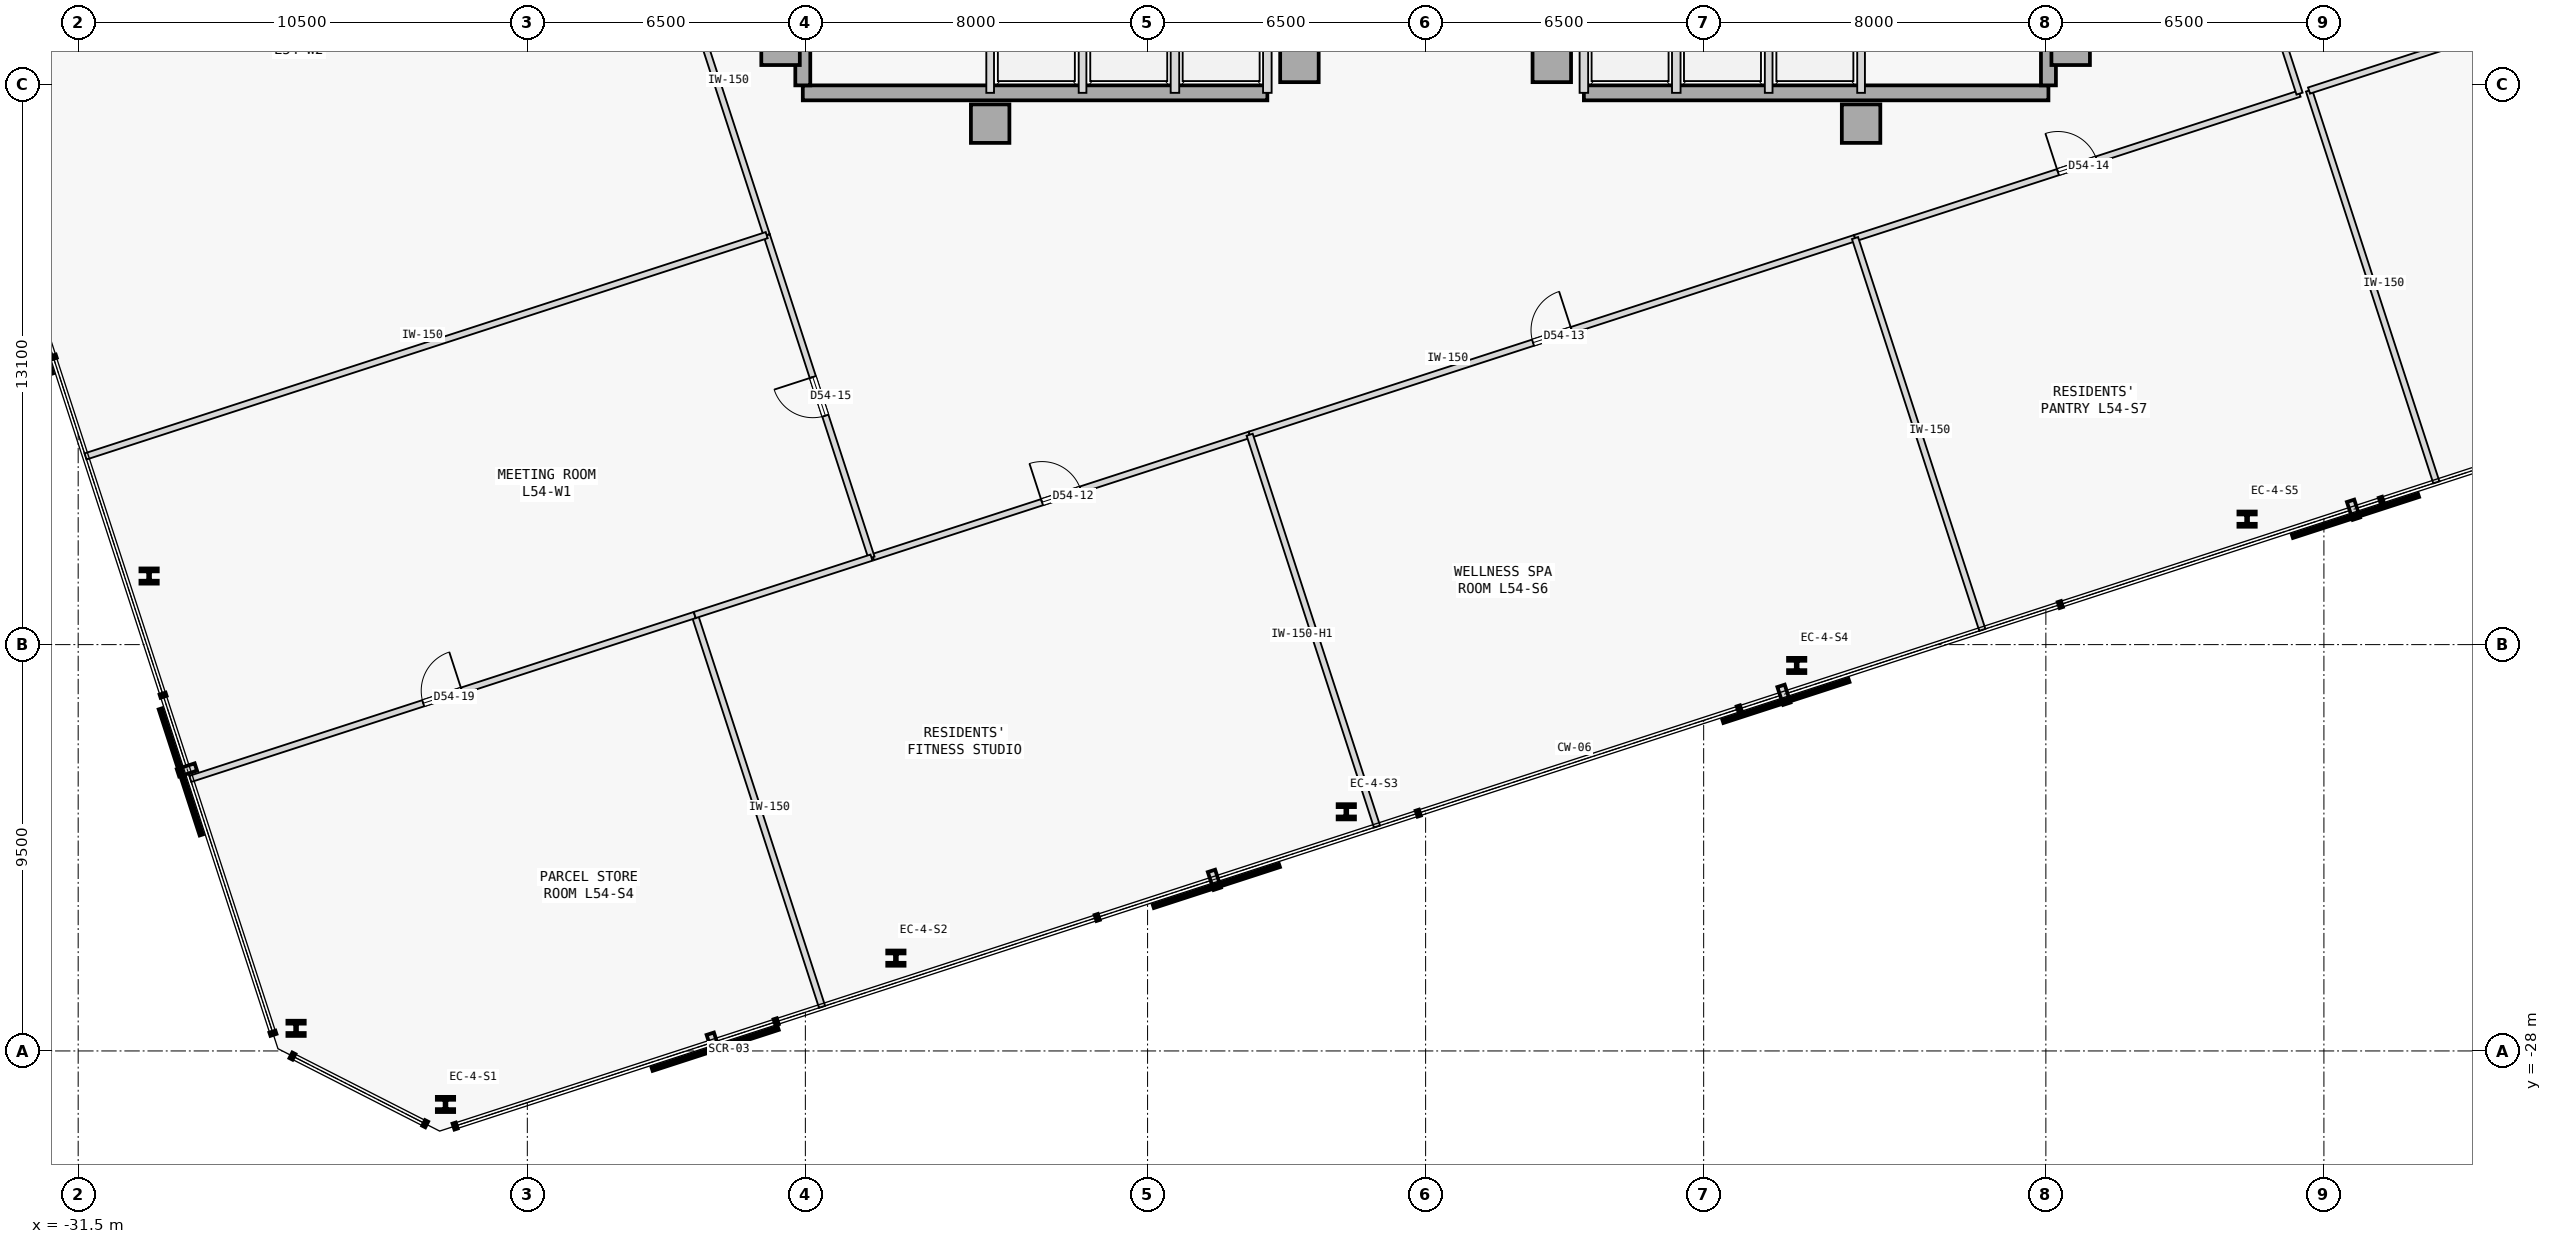
"""IFC4 building model, lengths in metres.
Left out: names, types, materials, properties, quantities, classifications, styles, units other than length and angle.
Written with IfcOpenShell. Run it as: python <this file> out.ifc"""

import sys

from ifc_helpers import new_model, si_unit, direction, frame, frame_2d, origin, origin_2d, place, context, subcontext, project, spatial, rectangle, i_section, extrude, element, fill, save


model = new_model("IFC4")
c1 = context("Model", 3, precision=1e-05, world=origin(), true_north=direction((0.0, 1.0)))
c2 = subcontext(c1, "Body", "Model", "MODEL_VIEW")
j1 = project(units=[si_unit("LENGTHUNIT", "METRE"), si_unit("PLANEANGLEUNIT", "RADIAN")], contexts=[c1])
p1 = place(None, origin())
s1 = spatial("IfcSite", under=j1, at=p1, CompositionType="ELEMENT")
p2 = place(p1, origin())
s2 = spatial("IfcBuilding", under=s1, at=p2, CompositionType="ELEMENT")
p3 = place(p2, frame((0.0, 0.0, 206.8)))
s3 = spatial("IfcBuildingStorey", under=s2, at=p3, CompositionType="ELEMENT", Elevation=206.8)
for number, where, z_axis, x_axis in (
    (1, (-15.08, -4.5, 0.0), (0.0, 0.0, 1.0), (1.0, 0.0, 0.0)),
    (2, (-10.18, -6.32, 0.0), (0.0, 0.0, 1.0), (1.0, 0.0, 0.0)),
    (3, (-2.95, -4.9, 0.0), (0.0, 0.0, 1.0), (1.0, 0.0, 0.0)),
    (4, (15.08, -4.5, 0.0), (0.0, 0.0, 1.0), (1.0, 0.0, 0.0)),
    (5, (10.18, -6.32, 0.0), (0.0, 0.0, 1.0), (1.0, 0.0, 0.0)),
    (6, (2.95, -4.9, 0.0), (0.0, 0.0, 1.0), (1.0, 0.0, 0.0)),
):
    element("IfcColumn", number, at=place(p3, frame(where, z_axis=z_axis, x_axis=x_axis)), inside=s3, PredefinedType="COLUMN", context=c2, shape_type="SweptSolid", body=[
        extrude(rectangle(XDim=0.9, YDim=0.9, at=origin_2d()), origin(), (0.0, 0.0, 1.0), 4.1),
    ])
p4 = place(p3, frame((-14.56, -5.6, 0.0), z_axis=(0.0, 0.0, 1.0), x_axis=(1.0, 0.0, 0.0)))
e7 = element("IfcWall", 7, at=p4, inside=s3, PredefinedType="SHEAR", context=c2, shape_type="SweptSolid", body=[
    extrude(rectangle(XDim=10.86, YDim=0.35, at=frame_2d((5.43, 0.0))), origin(), (0.0, 0.0, 1.0), 3.875),
])
p5 = place(p3, frame((-14.56, -5.425, 0.0), z_axis=(0.0, 0.0, 1.0), x_axis=(0.0, 1.0, 0.0)))
e8 = element("IfcWall", 8, at=p5, inside=s3, PredefinedType="SHEAR", context=c2, shape_type="SweptSolid", body=[
    extrude(rectangle(XDim=10.85, YDim=0.35, at=frame_2d((5.425, 0.0))), origin(), (0.0, 0.0, 1.0), 3.875),
])
p6 = place(p3, frame((3.7, -5.6, 0.0), z_axis=(0.0, 0.0, 1.0), x_axis=(1.0, 0.0, 0.0)))
e9 = element("IfcWall", 9, at=p6, inside=s3, PredefinedType="SHEAR", context=c2, shape_type="SweptSolid", body=[
    extrude(rectangle(XDim=10.86, YDim=0.35, at=frame_2d((5.43, 0.0))), origin(), (0.0, 0.0, 1.0), 3.875),
])
p7 = place(p3, frame((14.56, -5.425, 0.0), z_axis=(0.0, 0.0, 1.0), x_axis=(0.0, 1.0, 0.0)))
e10 = element("IfcWall", 10, at=p7, inside=s3, PredefinedType="SHEAR", context=c2, shape_type="SweptSolid", body=[
    extrude(rectangle(XDim=10.85, YDim=0.35, at=frame_2d((5.425, 0.0))), origin(), (0.0, 0.0, 1.0), 3.875),
])
for number, where, z_axis, x_axis in (
    (11, (-22.913, -29.251, 0.0), (0.0, 0.0, 1.0), (1.0, 0.0, 0.0)),
    (12, (-12.384, -25.83, 0.0), (0.0, 0.0, 1.0), (1.0, 0.0, 0.0)),
    (13, (-1.854, -22.409, 0.0), (0.0, 0.0, 1.0), (1.0, 0.0, 0.0)),
    (14, (8.675, -18.988, 0.0), (0.0, 0.0, 1.0), (1.0, 0.0, 0.0)),
    (15, (19.204, -15.566, 0.0), (0.0, 0.0, 1.0), (1.0, 0.0, 0.0)),
    (16, (-29.842, -16.897, 0.0), (0.0, 0.0, 1.0), (1.0, 0.0, 0.0)),
    (17, (-26.406, -27.471, 0.0), (0.0, 0.0, 1.0), (1.0, 0.0, 0.0)),
):
    element("IfcColumn", number, at=place(p3, frame(where, z_axis=z_axis, x_axis=x_axis)), inside=s3, PredefinedType="COLUMN", context=c2, shape_type="SweptSolid", body=[
        extrude(i_section(OverallWidth=0.405, OverallDepth=0.355, WebThickness=0.042, FlangeThickness=0.068, FilletRadius=0.015, at=origin_2d()), origin(), (0.0, 0.0, 1.0), 4.1),
    ])
for number, where, z_axis, x_axis in (
    (18, (-3.7, -5.6, 0.0), (0.0, 0.0, 1.0), (0.0, 1.0, 0.0)),
    (19, (-5.86, -5.6, 0.0), (0.0, 0.0, 1.0), (0.0, 1.0, 0.0)),
):
    element("IfcWall", number, at=place(p3, frame(where, z_axis=z_axis, x_axis=x_axis)), inside=s3, PredefinedType="STANDARD", context=c2, shape_type="SweptSolid", body=[
        extrude(rectangle(XDim=2.65, YDim=0.2, at=frame_2d((1.325, 0.0))), origin(), (0.0, 0.0, 1.0), 3.875),
    ])
for number, where, z_axis, x_axis in (
    (20, (-10.18, -5.6, 0.0), (0.0, 0.0, 1.0), (0.0, 1.0, 0.0)),
    (21, (-8.02, -5.6, 0.0), (0.0, 0.0, 1.0), (0.0, 1.0, 0.0)),
):
    element("IfcWall", number, at=place(p3, frame(where, z_axis=z_axis, x_axis=x_axis)), inside=s3, PredefinedType="STANDARD", context=c2, shape_type="SweptSolid", body=[
        extrude(rectangle(XDim=2.65, YDim=0.18, at=frame_2d((1.325, 0.0))), origin(), (0.0, 0.0, 1.0), 3.875),
    ])
for number, where, z_axis, x_axis in (
    (22, (3.7, -5.6, 0.0), (0.0, 0.0, 1.0), (0.0, 1.0, 0.0)),
    (23, (5.86, -5.6, 0.0), (0.0, 0.0, 1.0), (0.0, 1.0, 0.0)),
):
    element("IfcWall", number, at=place(p3, frame(where, z_axis=z_axis, x_axis=x_axis)), inside=s3, PredefinedType="STANDARD", context=c2, shape_type="SweptSolid", body=[
        extrude(rectangle(XDim=2.65, YDim=0.2, at=frame_2d((1.325, 0.0))), origin(), (0.0, 0.0, 1.0), 3.875),
    ])
for number, where, z_axis, x_axis in (
    (24, (10.18, -5.6, 0.0), (0.0, 0.0, 1.0), (0.0, 1.0, 0.0)),
    (25, (8.02, -5.6, 0.0), (0.0, 0.0, 1.0), (0.0, 1.0, 0.0)),
):
    element("IfcWall", number, at=place(p3, frame(where, z_axis=z_axis, x_axis=x_axis)), inside=s3, PredefinedType="STANDARD", context=c2, shape_type="SweptSolid", body=[
        extrude(rectangle(XDim=2.65, YDim=0.18, at=frame_2d((1.325, 0.0))), origin(), (0.0, 0.0, 1.0), 3.875),
    ])
p8 = place(p3, frame((-12.918, -16.454, 0.0), z_axis=(0.0, 0.0, 1.0), x_axis=(0.951058289859, 0.309011535854, 0.0)))
e26 = element("IfcWall", 26, at=p8, inside=s3, PredefinedType="PARTITIONING", context=c2, shape_type="SweptSolid", body=[
    extrude(rectangle(XDim=9.258, YDim=0.15, at=frame_2d((4.629, 0.0))), origin(), (0.0, 0.0, 1.0), 3.875),
])
p9 = place(p8, frame((4.154, 0.0, 0.0)))
e27 = element("IfcOpeningElement", 27, at=p9, cuts=e26, PredefinedType="OPENING", context=c2, shape_type="SweptSolid", body=[
    extrude(rectangle(XDim=0.95, YDim=2.15, at=frame_2d((0.475, 1.075))), frame((0.0, 0.085, 0.0), z_axis=(0.0, -1.0, 0.0), x_axis=(1.0, 0.0, 0.0)), (0.0, 0.0, 1.0), 0.17),
])
p10 = place(p3, frame((-4.113, -13.593, 0.0), z_axis=(0.0, 0.0, 1.0), x_axis=(0.951056372561, 0.309017436743, 0.0)))
e28 = element("IfcWall", 28, at=p10, inside=s3, PredefinedType="PARTITIONING", context=c2, shape_type="SweptSolid", body=[
    extrude(rectangle(XDim=14.88, YDim=0.15, at=frame_2d((7.44, 0.0))), origin(), (0.0, 0.0, 1.0), 3.875),
])
p11 = place(p10, frame((6.965, 0.0, 0.0)))
e29 = element("IfcOpeningElement", 29, at=p11, cuts=e28, PredefinedType="OPENING", context=c2, shape_type="SweptSolid", body=[
    extrude(rectangle(XDim=0.95, YDim=2.15, at=frame_2d((0.475, 1.075))), frame((0.0, 0.085, 0.0), z_axis=(0.0, -1.0, 0.0), x_axis=(1.0, 0.0, 0.0)), (0.0, 0.0, 1.0), 0.17),
])
p12 = place(p3, frame((10.038, -8.995, 0.0), z_axis=(0.0, 0.0, 1.0), x_axis=(0.951055575401, 0.309019890135, 0.0)))
e30 = element("IfcWall", 30, at=p12, inside=s3, PredefinedType="PARTITIONING", context=c2, shape_type="SweptSolid", body=[
    extrude(rectangle(XDim=10.927, YDim=0.15, at=frame_2d((5.464, 0.0))), origin(), (0.0, 0.0, 1.0), 3.875),
])
p13 = place(p12, frame((4.989, 0.0, 0.0)))
e31 = element("IfcOpeningElement", 31, at=p13, cuts=e30, PredefinedType="OPENING", context=c2, shape_type="SweptSolid", body=[
    extrude(rectangle(XDim=0.95, YDim=2.15, at=frame_2d((0.475, 1.075))), frame((0.0, 0.085, 0.0), z_axis=(0.0, -1.0, 0.0), x_axis=(1.0, 0.0, 0.0)), (0.0, 0.0, 1.0), 0.17),
])
p14 = place(p3, frame((-12.954, -16.466, 0.0), z_axis=(0.0, 0.0, 1.0), x_axis=(-0.309039411751, 0.951049232156, 0.0)))
e32 = element("IfcWall", 32, at=p14, inside=s3, PredefinedType="PARTITIONING", context=c2, shape_type="SweptSolid", body=[
    extrude(rectangle(XDim=7.927, YDim=0.15, at=frame_2d((3.963, 0.0))), origin(), (0.0, 0.0, 1.0), 3.875),
])
p15 = place(p14, frame((3.489, 0.0, 0.0)))
e33 = element("IfcOpeningElement", 33, at=p15, cuts=e32, PredefinedType="OPENING", context=c2, shape_type="SweptSolid", body=[
    extrude(rectangle(XDim=0.95, YDim=2.15, at=frame_2d((0.475, 1.075))), frame((0.0, 0.085, 0.0), z_axis=(0.0, -1.0, 0.0), x_axis=(1.0, 0.0, 0.0)), (0.0, 0.0, 1.0), 0.17),
])
p16 = place(p3, frame((-15.404, -8.927, 0.0), z_axis=(0.0, 0.0, 1.0), x_axis=(-0.309002477631, 0.951061232949, 0.0)))
e34 = element("IfcWall", 34, at=p16, inside=s3, PredefinedType="PARTITIONING", context=c2, shape_type="SweptSolid", body=[
    extrude(rectangle(XDim=15.387, YDim=0.15, at=frame_2d((7.693, 0.0))), origin(), (0.0, 0.0, 1.0), 3.875),
])
p17 = place(p16, frame((7.219, 0.0, 0.0)))
e35 = element("IfcOpeningElement", 35, at=p17, cuts=e34, PredefinedType="OPENING", context=c2, shape_type="SweptSolid", body=[
    extrude(rectangle(XDim=0.95, YDim=2.15, at=frame_2d((0.475, 1.075))), frame((0.0, 0.085, 0.0), z_axis=(0.0, -1.0, 0.0), x_axis=(1.0, 0.0, 0.0)), (0.0, 0.0, 1.0), 0.17),
])
p18 = place(p3, frame((20.431, -5.618, 0.0), z_axis=(0.0, 0.0, 1.0), x_axis=(-0.309021492288, 0.951055054823, 0.0)))
e36 = element("IfcWall", 36, at=p18, inside=s3, PredefinedType="PARTITIONING", context=c2, shape_type="SweptSolid", body=[
    extrude(rectangle(XDim=15.387, YDim=0.15, at=frame_2d((7.693, 0.0))), origin(), (0.0, 0.0, 1.0), 3.875),
])
p19 = place(p18, frame((7.219, 0.0, 0.0)))
e37 = element("IfcOpeningElement", 37, at=p19, cuts=e36, PredefinedType="OPENING", context=c2, shape_type="SweptSolid", body=[
    extrude(rectangle(XDim=0.95, YDim=2.15, at=frame_2d((0.475, 1.075))), frame((0.0, 0.085, 0.0), z_axis=(0.0, -1.0, 0.0), x_axis=(1.0, 0.0, 0.0)), (0.0, 0.0, 1.0), 0.17),
])
p20 = place(p3, frame((-14.109, -26.969, 0.0), z_axis=(0.0, 0.0, 1.0), x_axis=(-0.309009842949, 0.951058839905, 0.0)))
e38 = element("IfcWall", 38, at=p20, inside=s3, PredefinedType="PARTITIONING", context=c2, shape_type="SweptSolid", body=[
    extrude(rectangle(XDim=9.632, YDim=0.15, at=frame_2d((4.816, 0.0))), origin(), (0.0, 0.0, 1.0), 3.875),
])
p21 = place(p3, frame((-28.879, -21.64, 0.0), z_axis=(0.0, 0.0, 1.0), x_axis=(0.951057939298, 0.309012614787, 0.0)))
e39 = element("IfcWall", 39, at=p21, inside=s3, PredefinedType="PARTITIONING", context=c2, shape_type="SweptSolid", body=[
    extrude(rectangle(XDim=12.4, YDim=0.15, at=frame_2d((6.2, 0.0))), origin(), (0.0, 0.0, 1.0), 3.875),
])
p22 = place(p21, frame((5.725, 0.0, 0.0)))
e40 = element("IfcOpeningElement", 40, at=p22, cuts=e39, PredefinedType="OPENING", context=c2, shape_type="SweptSolid", body=[
    extrude(rectangle(XDim=0.95, YDim=2.15, at=frame_2d((0.475, 1.075))), frame((0.0, 0.085, 0.0), z_axis=(0.0, -1.0, 0.0), x_axis=(1.0, 0.0, 0.0)), (0.0, 0.0, 1.0), 0.17),
])
p23 = place(p3, frame((-1.137, -22.754, 0.0), z_axis=(0.0, 0.0, 1.0), x_axis=(-0.309002393867, 0.951061260164, 0.0)))
e41 = element("IfcWall", 41, at=p23, inside=s3, PredefinedType="PARTITIONING", context=c2, shape_type="SweptSolid", body=[
    extrude(rectangle(XDim=9.632, YDim=0.15, at=frame_2d((4.816, 0.0))), origin(), (0.0, 0.0, 1.0), 3.425),
])
p24 = place(p3, frame((-17.086, -17.808, 0.0), z_axis=(0.0, 0.0, 1.0), x_axis=(0.951044806522, 0.309053031028, 0.0)))
e42 = element("IfcWall", 42, at=p24, inside=s3, PredefinedType="PARTITIONING", context=c2, shape_type="SweptSolid", body=[
    extrude(rectangle(XDim=4.344, YDim=0.15, at=frame_2d((2.172, 0.0))), origin(), (0.0, 0.0, 1.0), 3.875),
])
for number, where, z_axis, x_axis in (
    (43, (13.015, -18.156, 0.0), (0.0, 0.0, 1.0), (-0.309, 0.951, 0.0)),
    (44, (23.629, -14.707, 0.0), (0.0, 0.0, 1.0), (-0.309, 0.951, 0.0)),
):
    element("IfcWall", number, at=place(p3, frame(where, z_axis=z_axis, x_axis=x_axis)), inside=s3, PredefinedType="PARTITIONING", context=c2, shape_type="SweptSolid", body=[
        extrude(rectangle(XDim=9.632, YDim=0.15, at=frame_2d((4.816, 0.0))), origin(), (0.0, 0.0, 1.0), 3.875),
    ])
p25 = place(p3, frame((20.652, -5.546, 0.0), z_axis=(0.0, 0.0, 1.0), x_axis=(0.951057939298, 0.309012614787, 0.0)))
e45 = element("IfcWall", 45, at=p25, inside=s3, PredefinedType="PARTITIONING", context=c2, shape_type="SweptSolid", body=[
    extrude(rectangle(XDim=9.92, YDim=0.15, at=frame_2d((4.96, 0.0))), origin(), (0.0, 0.0, 1.0), 3.875),
])
p26 = place(p25, frame((4.485, 0.0, 0.0)))
e46 = element("IfcOpeningElement", 46, at=p26, cuts=e45, PredefinedType="OPENING", context=c2, shape_type="SweptSolid", body=[
    extrude(rectangle(XDim=0.95, YDim=2.15, at=frame_2d((0.475, 1.075))), frame((0.0, 0.085, 0.0), z_axis=(0.0, -1.0, 0.0), x_axis=(1.0, 0.0, 0.0)), (0.0, 0.0, 1.0), 0.17),
])
p27 = place(p3, frame((-31.328, -14.101, 0.0), z_axis=(0.0, 0.0, 1.0), x_axis=(0.951057425217, 0.309014196986, 0.0)))
e47 = element("IfcWall", 47, at=p27, inside=s3, PredefinedType="PARTITIONING", context=c2, shape_type="SweptSolid", body=[
    extrude(rectangle(XDim=16.744, YDim=0.15, at=frame_2d((8.372, 0.0))), origin(), (0.0, 0.0, 1.0), 3.875),
])
p28 = place(p9, origin())
e48 = element("IfcDoor", 48, at=p28, inside=s3, OperationType="SINGLE_SWING_LEFT", PredefinedType="DOOR", context=c2, shape_type="SweptSolid", body=[
    extrude(rectangle(XDim=0.95, YDim=2.15, at=frame_2d((0.475, 1.075))), frame((0.0, 0.025, 0.0), z_axis=(0.0, -1.0, 0.0), x_axis=(1.0, 0.0, 0.0)), (0.0, 0.0, 1.0), 0.05),
])
fill(e27, e48)
p29 = place(p11, origin())
e49 = element("IfcDoor", 49, at=p29, inside=s3, OperationType="SINGLE_SWING_RIGHT", PredefinedType="DOOR", context=c2, shape_type="SweptSolid", body=[
    extrude(rectangle(XDim=0.95, YDim=2.15, at=frame_2d((0.475, 1.075))), frame((0.0, 0.025, 0.0), z_axis=(0.0, -1.0, 0.0), x_axis=(1.0, 0.0, 0.0)), (0.0, 0.0, 1.0), 0.05),
])
fill(e29, e49)
p30 = place(p13, origin())
e50 = element("IfcDoor", 50, at=p30, inside=s3, OperationType="SINGLE_SWING_LEFT", PredefinedType="DOOR", context=c2, shape_type="SweptSolid", body=[
    extrude(rectangle(XDim=0.95, YDim=2.15, at=frame_2d((0.475, 1.075))), frame((0.0, 0.025, 0.0), z_axis=(0.0, -1.0, 0.0), x_axis=(1.0, 0.0, 0.0)), (0.0, 0.0, 1.0), 0.05),
])
fill(e31, e50)
p31 = place(p15, origin())
e51 = element("IfcDoor", 51, at=p31, inside=s3, OperationType="SINGLE_SWING_RIGHT", PredefinedType="DOOR", context=c2, shape_type="SweptSolid", body=[
    extrude(rectangle(XDim=0.95, YDim=2.15, at=frame_2d((0.475, 1.075))), frame((0.0, 0.025, 0.0), z_axis=(0.0, -1.0, 0.0), x_axis=(1.0, 0.0, 0.0)), (0.0, 0.0, 1.0), 0.05),
])
fill(e33, e51)
p32 = place(p22, origin())
e52 = element("IfcDoor", 52, at=p32, inside=s3, OperationType="SINGLE_SWING_RIGHT", PredefinedType="DOOR", context=c2, shape_type="SweptSolid", body=[
    extrude(rectangle(XDim=0.95, YDim=2.15, at=frame_2d((0.475, 1.075))), frame((0.0, 0.025, 0.0), z_axis=(0.0, -1.0, 0.0), x_axis=(1.0, 0.0, 0.0)), (0.0, 0.0, 1.0), 0.05),
])
fill(e40, e52)
save(model, sys.argv[1])
